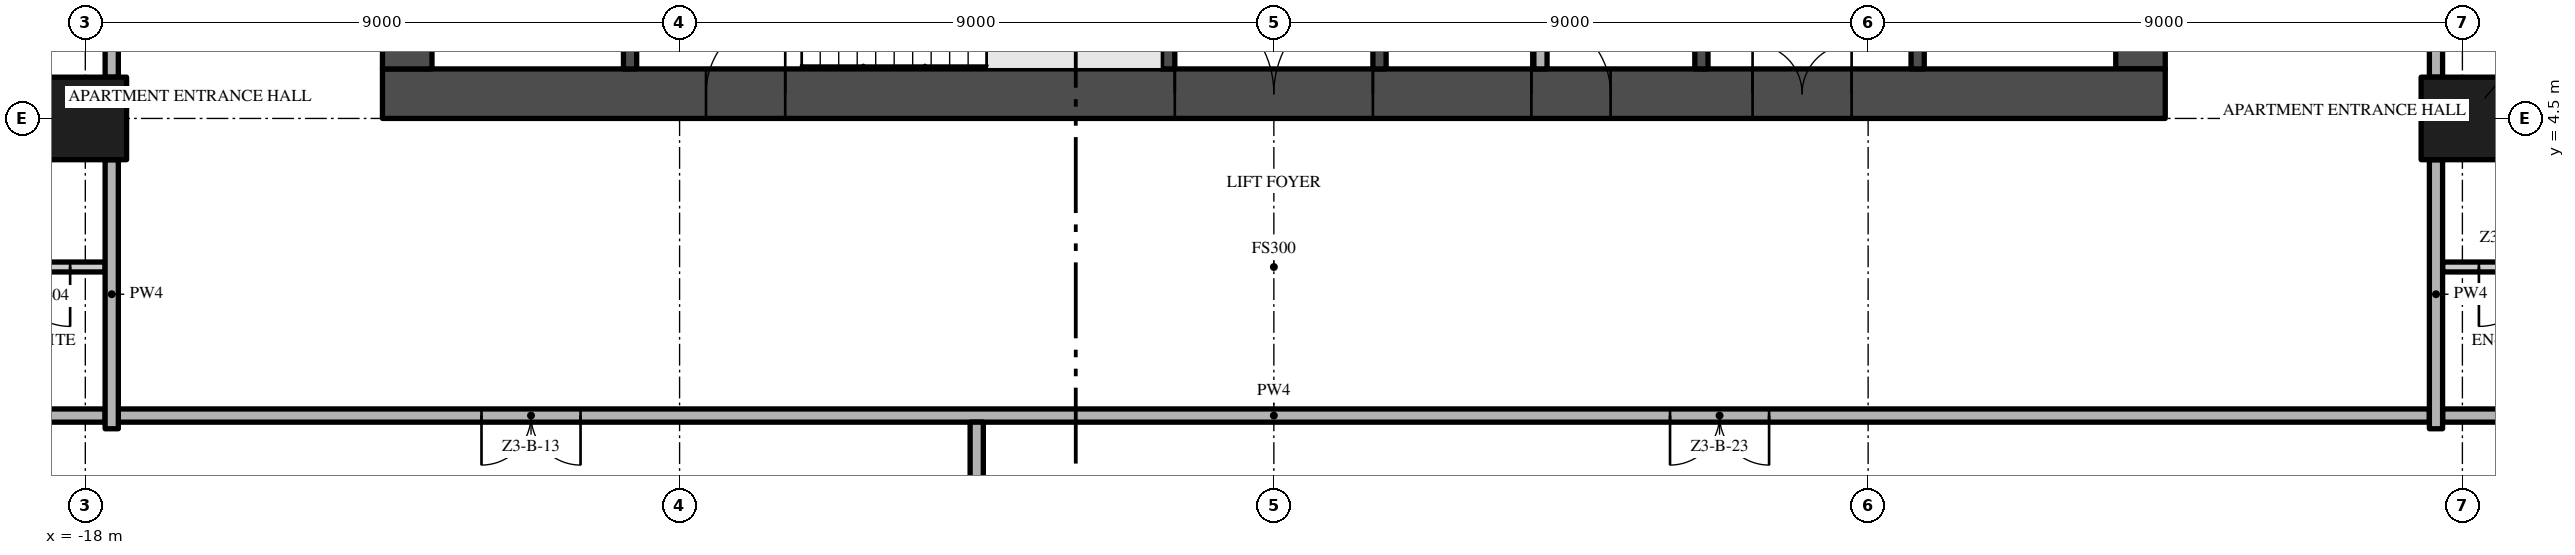
"""IFC4 building model, lengths in metres.
Left out: names, types, materials, properties, quantities, classifications, styles, units other than length and angle.
Written with IfcOpenShell. Run it as: python <this file> out.ifc"""

import sys

from ifc_helpers import new_model, si_unit, direction, frame, frame_2d, origin, origin_2d, place, context, subcontext, project, spatial, rectangle, extrude, element, fill, save


model = new_model("IFC4")
c1 = context("Model", 3, precision=1e-05, world=origin(), true_north=direction((0.0, 1.0)))
c2 = subcontext(c1, "Body", "Model", "MODEL_VIEW")
j1 = project(units=[si_unit("LENGTHUNIT", "METRE"), si_unit("PLANEANGLEUNIT", "RADIAN")], contexts=[c1])
p1 = place(None, origin())
s1 = spatial("IfcSite", under=j1, at=p1, CompositionType="ELEMENT")
p2 = place(p1, origin())
s2 = spatial("IfcBuilding", under=s1, at=p2, CompositionType="ELEMENT")
p3 = place(p2, frame((0.0, 0.0, 144.0)))
s3 = spatial("IfcBuildingStorey", under=s2, at=p3, CompositionType="ELEMENT", Elevation=144.0)
p4 = place(p3, frame((-13.5, 4.875, -0.3), z_axis=(0.0, 0.0, 1.0), x_axis=(1.0, 0.0, 0.0)))
e1 = element("IfcWall", 1, at=p4, inside=s3, PredefinedType="SHEAR", context=c2, shape_type="SweptSolid", body=[
    extrude(rectangle(XDim=27.0, YDim=0.75, at=frame_2d((13.5, 0.0))), origin(), (0.0, 0.0, 1.0), 3.8),
])
p5 = place(p4, frame((12.0, 0.0, 0.3)))
e2 = element("IfcOpeningElement", 2, at=p5, cuts=e1, PredefinedType="OPENING", context=c2, shape_type="SweptSolid", body=[
    extrude(rectangle(XDim=3.0, YDim=2.4, at=frame_2d((1.5, 1.2))), frame((0.0, 0.385, 0.0), z_axis=(0.0, -1.0, 0.0), x_axis=(1.0, 0.0, 0.0)), (0.0, 0.0, 1.0), 0.77),
])
p6 = place(p4, frame((4.9, 0.0, 0.3)))
e3 = element("IfcOpeningElement", 3, at=p6, cuts=e1, PredefinedType="OPENING", context=c2, shape_type="SweptSolid", body=[
    extrude(rectangle(XDim=1.2, YDim=2.2, at=frame_2d((0.6, 1.1))), frame((0.0, 0.385, 0.0), z_axis=(0.0, -1.0, 0.0), x_axis=(1.0, 0.0, 0.0)), (0.0, 0.0, 1.0), 0.77),
])
p7 = place(p4, frame((20.75, 0.0, 0.3)))
e4 = element("IfcOpeningElement", 4, at=p7, cuts=e1, PredefinedType="OPENING", context=c2, shape_type="SweptSolid", body=[
    extrude(rectangle(XDim=1.5, YDim=2.2, at=frame_2d((0.75, 1.1))), frame((0.0, 0.385, 0.0), z_axis=(0.0, -1.0, 0.0), x_axis=(1.0, 0.0, 0.0)), (0.0, 0.0, 1.0), 0.77),
])
p8 = place(p4, frame((17.4, 0.0, 0.3)))
e5 = element("IfcOpeningElement", 5, at=p8, cuts=e1, PredefinedType="OPENING", context=c2, shape_type="SweptSolid", body=[
    extrude(rectangle(XDim=1.2, YDim=2.2, at=frame_2d((0.6, 1.1))), frame((0.0, 0.385, 0.0), z_axis=(0.0, -1.0, 0.0), x_axis=(1.0, 0.0, 0.0)), (0.0, 0.0, 1.0), 0.77),
])
p9 = place(p3, frame((13.125, 5.25, -0.3), z_axis=(0.0, 0.0, 1.0), x_axis=(0.0, 1.0, 0.0)))
e6 = element("IfcWall", 6, at=p9, inside=s3, PredefinedType="SHEAR", context=c2, shape_type="SweptSolid", body=[
    extrude(rectangle(XDim=16.5, YDim=0.75, at=frame_2d((8.25, 0.0))), origin(), (0.0, 0.0, 1.0), 3.8),
])
p10 = place(p9, frame((6.15, 0.0, 0.3)))
e7 = element("IfcOpeningElement", 7, at=p10, cuts=e6, PredefinedType="OPENING", context=c2, shape_type="SweptSolid", body=[
    extrude(rectangle(XDim=1.2, YDim=2.2, at=frame_2d((0.6, 1.1))), frame((0.0, 0.385, 0.0), z_axis=(0.0, -1.0, 0.0), x_axis=(1.0, 0.0, 0.0)), (0.0, 0.0, 1.0), 0.77),
])
p11 = place(p3, frame((-13.125, 21.75, -0.3), z_axis=(0.0, 0.0, 1.0), x_axis=(0.0, -1.0, 0.0)))
e8 = element("IfcWall", 8, at=p11, inside=s3, PredefinedType="SHEAR", context=c2, shape_type="SweptSolid", body=[
    extrude(rectangle(XDim=16.5, YDim=0.75, at=frame_2d((8.25, 0.0))), origin(), (0.0, 0.0, 1.0), 3.8),
])
p12 = place(p11, frame((9.15, 0.0, 0.3)))
e9 = element("IfcOpeningElement", 9, at=p12, cuts=e8, PredefinedType="OPENING", context=c2, shape_type="SweptSolid", body=[
    extrude(rectangle(XDim=1.2, YDim=2.2, at=frame_2d((0.6, 1.1))), frame((0.0, 0.385, 0.0), z_axis=(0.0, -1.0, 0.0), x_axis=(1.0, 0.0, 0.0)), (0.0, 0.0, 1.0), 0.77),
])
for number, where, z_axis, x_axis in (
    (10, (-18.0, 4.5, 0.0), (0.0, 0.0, 1.0), (1.0, 0.0, 0.0)),
    (11, (18.0, 4.5, 0.0), (0.0, 0.0, 1.0), (1.0, 0.0, 0.0)),
):
    element("IfcColumn", number, at=place(p3, frame(where, z_axis=z_axis, x_axis=x_axis)), inside=s3, PredefinedType="COLUMN", context=c2, shape_type="SweptSolid", body=[
        extrude(rectangle(XDim=1.25, YDim=1.25, at=origin_2d()), origin(), (0.0, 0.0, 1.0), 3.5),
    ])
for number, where, z_axis, x_axis in (
    (12, (-9.75, 5.25, 0.0), (0.0, 0.0, 1.0), (0.0, 1.0, 0.0)),
    (13, (-1.6, 5.25, 0.0), (0.0, 0.0, 1.0), (0.0, 1.0, 0.0)),
):
    element("IfcWall", number, at=place(p3, frame(where, z_axis=z_axis, x_axis=x_axis)), inside=s3, PredefinedType="SHEAR", context=c2, shape_type="SweptSolid", body=[
        extrude(rectangle(XDim=2.7, YDim=0.2, at=frame_2d((1.35, 0.0))), origin(), (0.0, 0.0, 1.0), 3.5),
    ])
p13 = place(p3, frame((1.6, 9.8, 0.0), z_axis=(0.0, 0.0, 1.0), x_axis=(0.0, -1.0, 0.0)))
e14 = element("IfcWall", 14, at=p13, inside=s3, PredefinedType="SHEAR", context=c2, shape_type="SweptSolid", body=[
    extrude(rectangle(XDim=4.55, YDim=0.2, at=frame_2d((2.275, 0.0))), origin(), (0.0, 0.0, 1.0), 3.5),
])
p14 = place(p13, frame((1.425, 0.0, 0.0)))
e15 = element("IfcOpeningElement", 15, at=p14, cuts=e14, PredefinedType="OPENING", context=c2, shape_type="SweptSolid", body=[
    extrude(rectangle(XDim=0.9, YDim=2.1, at=frame_2d((0.45, 1.05))), frame((0.0, 0.11, 0.0), z_axis=(0.0, -1.0, 0.0), x_axis=(1.0, 0.0, 0.0)), (0.0, 0.0, 1.0), 0.22),
])
p15 = place(p3, frame((4.037, 9.8, 0.0), z_axis=(0.0, 0.0, 1.0), x_axis=(0.0, -1.0, 0.0)))
e16 = element("IfcWall", 16, at=p15, inside=s3, PredefinedType="PARTITIONING", context=c2, shape_type="SweptSolid", body=[
    extrude(rectangle(XDim=4.55, YDim=0.2, at=frame_2d((2.275, 0.0))), origin(), (0.0, 0.0, 1.0), 3.5),
])
p16 = place(p15, frame((1.825, 0.0, 0.0)))
e17 = element("IfcOpeningElement", 17, at=p16, cuts=e16, PredefinedType="OPENING", context=c2, shape_type="SweptSolid", body=[
    extrude(rectangle(XDim=0.9, YDim=2.1, at=frame_2d((0.45, 1.05))), frame((0.0, 0.11, 0.0), z_axis=(0.0, -1.0, 0.0), x_axis=(1.0, 0.0, 0.0)), (0.0, 0.0, 1.0), 0.22),
])
p17 = place(p3, frame((6.475, 5.25, 0.0), z_axis=(0.0, 0.0, 1.0), x_axis=(0.0, 1.0, 0.0)))
e18 = element("IfcWall", 18, at=p17, inside=s3, PredefinedType="SHEAR", context=c2, shape_type="SweptSolid", body=[
    extrude(rectangle(XDim=4.55, YDim=0.2, at=frame_2d((2.275, 0.0))), origin(), (0.0, 0.0, 1.0), 3.5),
])
p18 = place(p3, frame((9.75, 5.25, 0.0), z_axis=(0.0, 0.0, 1.0), x_axis=(0.0, 1.0, 0.0)))
e19 = element("IfcWall", 19, at=p18, inside=s3, PredefinedType="SHEAR", context=c2, shape_type="SweptSolid", body=[
    extrude(rectangle(XDim=2.35, YDim=0.2, at=frame_2d((1.175, 0.0))), origin(), (0.0, 0.0, 1.0), 3.5),
])
p19 = place(p18, frame((0.7, 0.0, 0.0)))
e20 = element("IfcOpeningElement", 20, at=p19, cuts=e19, PredefinedType="OPENING", context=c2, shape_type="SweptSolid", body=[
    extrude(rectangle(XDim=1.1, YDim=2.1, at=frame_2d((0.55, 1.05))), frame((0.0, 0.11, 0.0), z_axis=(0.0, -1.0, 0.0), x_axis=(1.0, 0.0, 0.0)), (0.0, 0.0, 1.0), 0.22),
])
p20 = place(p3, frame((17.5, 0.0, 0.0), z_axis=(0.0, 0.0, 1.0), x_axis=(-1.0, 0.0, 0.0)))
e21 = element("IfcWall", 21, at=p20, inside=s3, PredefinedType="PARTITIONING", context=c2, shape_type="SweptSolid", body=[
    extrude(rectangle(XDim=35.0, YDim=0.2, at=frame_2d((17.5, 0.0))), origin(), (0.0, 0.0, 1.0), 3.5),
])
p21 = place(p20, frame((28.0, 0.0, 0.0)))
e22 = element("IfcOpeningElement", 22, at=p21, cuts=e21, PredefinedType="OPENING", context=c2, shape_type="SweptSolid", body=[
    extrude(rectangle(XDim=1.5, YDim=2.4, at=frame_2d((0.75, 1.2))), frame((0.0, 0.11, 0.0), z_axis=(0.0, -1.0, 0.0), x_axis=(1.0, 0.0, 0.0)), (0.0, 0.0, 1.0), 0.22),
])
p22 = place(p20, frame((10.0, 0.0, 0.0)))
e23 = element("IfcOpeningElement", 23, at=p22, cuts=e21, PredefinedType="OPENING", context=c2, shape_type="SweptSolid", body=[
    extrude(rectangle(XDim=1.5, YDim=2.4, at=frame_2d((0.75, 1.2))), frame((0.0, 0.11, 0.0), z_axis=(0.0, -1.0, 0.0), x_axis=(1.0, 0.0, 0.0)), (0.0, 0.0, 1.0), 0.22),
])
for number, where, z_axis, x_axis in (
    (24, (-22.2, 0.0, 0.0), (0.0, 0.0, 1.0), (1.0, 0.0, 0.0)),
    (25, (17.7, 0.0, 0.0), (0.0, 0.0, 1.0), (1.0, 0.0, 0.0)),
):
    element("IfcWall", number, at=place(p3, frame(where, z_axis=z_axis, x_axis=x_axis)), inside=s3, PredefinedType="PARTITIONING", context=c2, shape_type="SweptSolid", body=[
        extrude(rectangle(XDim=4.5, YDim=0.2, at=frame_2d((2.25, 0.0))), origin(), (0.0, 0.0, 1.0), 3.5),
    ])
p23 = place(p3, frame((-17.7, 2.25, 0.0), z_axis=(0.0, 0.0, 1.0), x_axis=(-1.0, 0.0, 0.0)))
e26 = element("IfcWall", 26, at=p23, inside=s3, PredefinedType="PARTITIONING", context=c2, shape_type="SweptSolid", body=[
    extrude(rectangle(XDim=2.03, YDim=0.15, at=frame_2d((1.015, 0.0))), origin(), (0.0, 0.0, 1.0), 3.5),
])
p24 = place(p23, frame((0.53, 0.0, 0.0)))
e27 = element("IfcOpeningElement", 27, at=p24, cuts=e26, PredefinedType="OPENING", context=c2, shape_type="SweptSolid", body=[
    extrude(rectangle(XDim=0.9, YDim=2.1, at=frame_2d((0.45, 1.05))), frame((0.0, 0.085, 0.0), z_axis=(0.0, -1.0, 0.0), x_axis=(1.0, 0.0, 0.0)), (0.0, 0.0, 1.0), 0.17),
])
p25 = place(p3, frame((19.73, 2.25, 0.0), z_axis=(0.0, 0.0, 1.0), x_axis=(-1.0, 0.0, 0.0)))
e28 = element("IfcWall", 28, at=p25, inside=s3, PredefinedType="PARTITIONING", context=c2, shape_type="SweptSolid", body=[
    extrude(rectangle(XDim=2.03, YDim=0.15, at=frame_2d((1.015, 0.0))), origin(), (0.0, 0.0, 1.0), 3.5),
])
p26 = place(p25, frame((0.58, 0.0, 0.0)))
e29 = element("IfcOpeningElement", 29, at=p26, cuts=e28, PredefinedType="OPENING", context=c2, shape_type="SweptSolid", body=[
    extrude(rectangle(XDim=0.9, YDim=2.1, at=frame_2d((0.45, 1.05))), frame((0.0, 0.085, 0.0), z_axis=(0.0, -1.0, 0.0), x_axis=(1.0, 0.0, 0.0)), (0.0, 0.0, 1.0), 0.17),
])
p27 = place(p3, frame((-17.6, -0.2, 0.0), z_axis=(0.0, 0.0, 1.0), x_axis=(0.0, 1.0, 0.0)))
e30 = element("IfcWall", 30, at=p27, inside=s3, PredefinedType="PARTITIONING", context=c2, shape_type="SweptSolid", body=[
    extrude(rectangle(XDim=4.075, YDim=0.2, at=frame_2d((2.038, 0.0))), origin(), (0.0, 0.0, 1.0), 3.5),
])
p28 = place(p3, frame((-17.6, 5.125, 0.0), z_axis=(0.0, 0.0, 1.0), x_axis=(0.0, 1.0, 0.0)))
e31 = element("IfcWall", 31, at=p28, inside=s3, PredefinedType="PARTITIONING", context=c2, shape_type="SweptSolid", body=[
    extrude(rectangle(XDim=7.75, YDim=0.2, at=frame_2d((3.875, 0.0))), origin(), (0.0, 0.0, 1.0), 3.5),
])
p29 = place(p28, frame((1.0, 0.0, 0.0)))
e32 = element("IfcOpeningElement", 32, at=p29, cuts=e31, PredefinedType="OPENING", context=c2, shape_type="SweptSolid", body=[
    extrude(rectangle(XDim=1.2, YDim=2.4, at=frame_2d((0.6, 1.2))), frame((0.0, 0.11, 0.0), z_axis=(0.0, -1.0, 0.0), x_axis=(1.0, 0.0, 0.0)), (0.0, 0.0, 1.0), 0.22),
])
p30 = place(p3, frame((-4.5, -17.7, 0.0), z_axis=(0.0, 0.0, 1.0), x_axis=(0.0, 1.0, 0.0)))
e33 = element("IfcWall", 33, at=p30, inside=s3, PredefinedType="PARTITIONING", context=c2, shape_type="SweptSolid", body=[
    extrude(rectangle(XDim=17.6, YDim=0.2, at=frame_2d((8.8, 0.0))), origin(), (0.0, 0.0, 1.0), 3.5),
])
p31 = place(p3, frame((17.6, -0.2, 0.0), z_axis=(0.0, 0.0, 1.0), x_axis=(0.0, 1.0, 0.0)))
e34 = element("IfcWall", 34, at=p31, inside=s3, PredefinedType="PARTITIONING", context=c2, shape_type="SweptSolid", body=[
    extrude(rectangle(XDim=4.075, YDim=0.2, at=frame_2d((2.038, 0.0))), origin(), (0.0, 0.0, 1.0), 3.5),
])
p32 = place(p3, frame((17.6, 12.875, 0.0), z_axis=(0.0, 0.0, 1.0), x_axis=(0.0, -1.0, 0.0)))
e35 = element("IfcWall", 35, at=p32, inside=s3, PredefinedType="PARTITIONING", context=c2, shape_type="SweptSolid", body=[
    extrude(rectangle(XDim=7.75, YDim=0.2, at=frame_2d((3.875, 0.0))), origin(), (0.0, 0.0, 1.0), 3.5),
])
p33 = place(p32, frame((5.55, 0.0, 0.0)))
e36 = element("IfcOpeningElement", 36, at=p33, cuts=e35, PredefinedType="OPENING", context=c2, shape_type="SweptSolid", body=[
    extrude(rectangle(XDim=1.2, YDim=2.4, at=frame_2d((0.6, 1.2))), frame((0.0, 0.11, 0.0), z_axis=(0.0, -1.0, 0.0), x_axis=(1.0, 0.0, 0.0)), (0.0, 0.0, 1.0), 0.22),
])
p34 = place(p5, frame((3.0, 0.0, 0.0), z_axis=(0.0, 0.0, 1.0), x_axis=(-1.0, 0.0, 0.0)))
e37 = element("IfcDoor", 37, at=p34, inside=s3, OperationType="DOUBLE_DOOR_SINGLE_SWING", PredefinedType="DOOR", context=c2, shape_type="SweptSolid", body=[
    extrude(rectangle(XDim=3.0, YDim=2.4, at=frame_2d((1.5, 1.2))), frame((0.0, 0.025, 0.0), z_axis=(0.0, -1.0, 0.0), x_axis=(1.0, 0.0, 0.0)), (0.0, 0.0, 1.0), 0.05),
])
fill(e2, e37)
p35 = place(p6, frame((1.2, 0.0, 0.0), z_axis=(0.0, 0.0, 1.0), x_axis=(-1.0, 0.0, 0.0)))
e38 = element("IfcDoor", 38, at=p35, inside=s3, OperationType="SINGLE_SWING_LEFT", PredefinedType="DOOR", context=c2, shape_type="SweptSolid", body=[
    extrude(rectangle(XDim=1.2, YDim=2.2, at=frame_2d((0.6, 1.1))), frame((0.0, 0.025, 0.0), z_axis=(0.0, -1.0, 0.0), x_axis=(1.0, 0.0, 0.0)), (0.0, 0.0, 1.0), 0.05),
])
fill(e3, e38)
p36 = place(p7, frame((1.5, 0.0, 0.0), z_axis=(0.0, 0.0, 1.0), x_axis=(-1.0, 0.0, 0.0)))
e39 = element("IfcDoor", 39, at=p36, inside=s3, OperationType="DOUBLE_DOOR_SINGLE_SWING", PredefinedType="DOOR", context=c2, shape_type="SweptSolid", body=[
    extrude(rectangle(XDim=1.5, YDim=2.2, at=frame_2d((0.75, 1.1))), frame((0.0, 0.025, 0.0), z_axis=(0.0, -1.0, 0.0), x_axis=(1.0, 0.0, 0.0)), (0.0, 0.0, 1.0), 0.05),
])
fill(e4, e39)
p37 = place(p8, frame((1.2, 0.0, 0.0), z_axis=(0.0, 0.0, 1.0), x_axis=(-1.0, 0.0, 0.0)))
e40 = element("IfcDoor", 40, at=p37, inside=s3, OperationType="SINGLE_SWING_RIGHT", PredefinedType="DOOR", context=c2, shape_type="SweptSolid", body=[
    extrude(rectangle(XDim=1.2, YDim=2.2, at=frame_2d((0.6, 1.1))), frame((0.0, 0.025, 0.0), z_axis=(0.0, -1.0, 0.0), x_axis=(1.0, 0.0, 0.0)), (0.0, 0.0, 1.0), 0.05),
])
fill(e5, e40)
p38 = place(p24, origin())
e41 = element("IfcDoor", 41, at=p38, inside=s3, OperationType="SINGLE_SWING_LEFT", PredefinedType="DOOR", context=c2, shape_type="SweptSolid", body=[
    extrude(rectangle(XDim=0.9, YDim=2.1, at=frame_2d((0.45, 1.05))), frame((0.0, 0.025, 0.0), z_axis=(0.0, -1.0, 0.0), x_axis=(1.0, 0.0, 0.0)), (0.0, 0.0, 1.0), 0.05),
])
fill(e27, e41)
p39 = place(p26, origin())
e42 = element("IfcDoor", 42, at=p39, inside=s3, OperationType="SINGLE_SWING_RIGHT", PredefinedType="DOOR", context=c2, shape_type="SweptSolid", body=[
    extrude(rectangle(XDim=0.9, YDim=2.1, at=frame_2d((0.45, 1.05))), frame((0.0, 0.025, 0.0), z_axis=(0.0, -1.0, 0.0), x_axis=(1.0, 0.0, 0.0)), (0.0, 0.0, 1.0), 0.05),
])
fill(e29, e42)
p40 = place(p21, origin())
e43 = element("IfcDoor", 43, at=p40, inside=s3, OperationType="DOUBLE_DOOR_SINGLE_SWING", PredefinedType="DOOR", context=c2, shape_type="SweptSolid", body=[
    extrude(rectangle(XDim=1.5, YDim=2.4, at=frame_2d((0.75, 1.2))), frame((0.0, 0.025, 0.0), z_axis=(0.0, -1.0, 0.0), x_axis=(1.0, 0.0, 0.0)), (0.0, 0.0, 1.0), 0.05),
])
fill(e22, e43)
p41 = place(p22, origin())
e44 = element("IfcDoor", 44, at=p41, inside=s3, OperationType="DOUBLE_DOOR_SINGLE_SWING", PredefinedType="DOOR", context=c2, shape_type="SweptSolid", body=[
    extrude(rectangle(XDim=1.5, YDim=2.4, at=frame_2d((0.75, 1.2))), frame((0.0, 0.025, 0.0), z_axis=(0.0, -1.0, 0.0), x_axis=(1.0, 0.0, 0.0)), (0.0, 0.0, 1.0), 0.05),
])
fill(e23, e44)
save(model, sys.argv[1])
